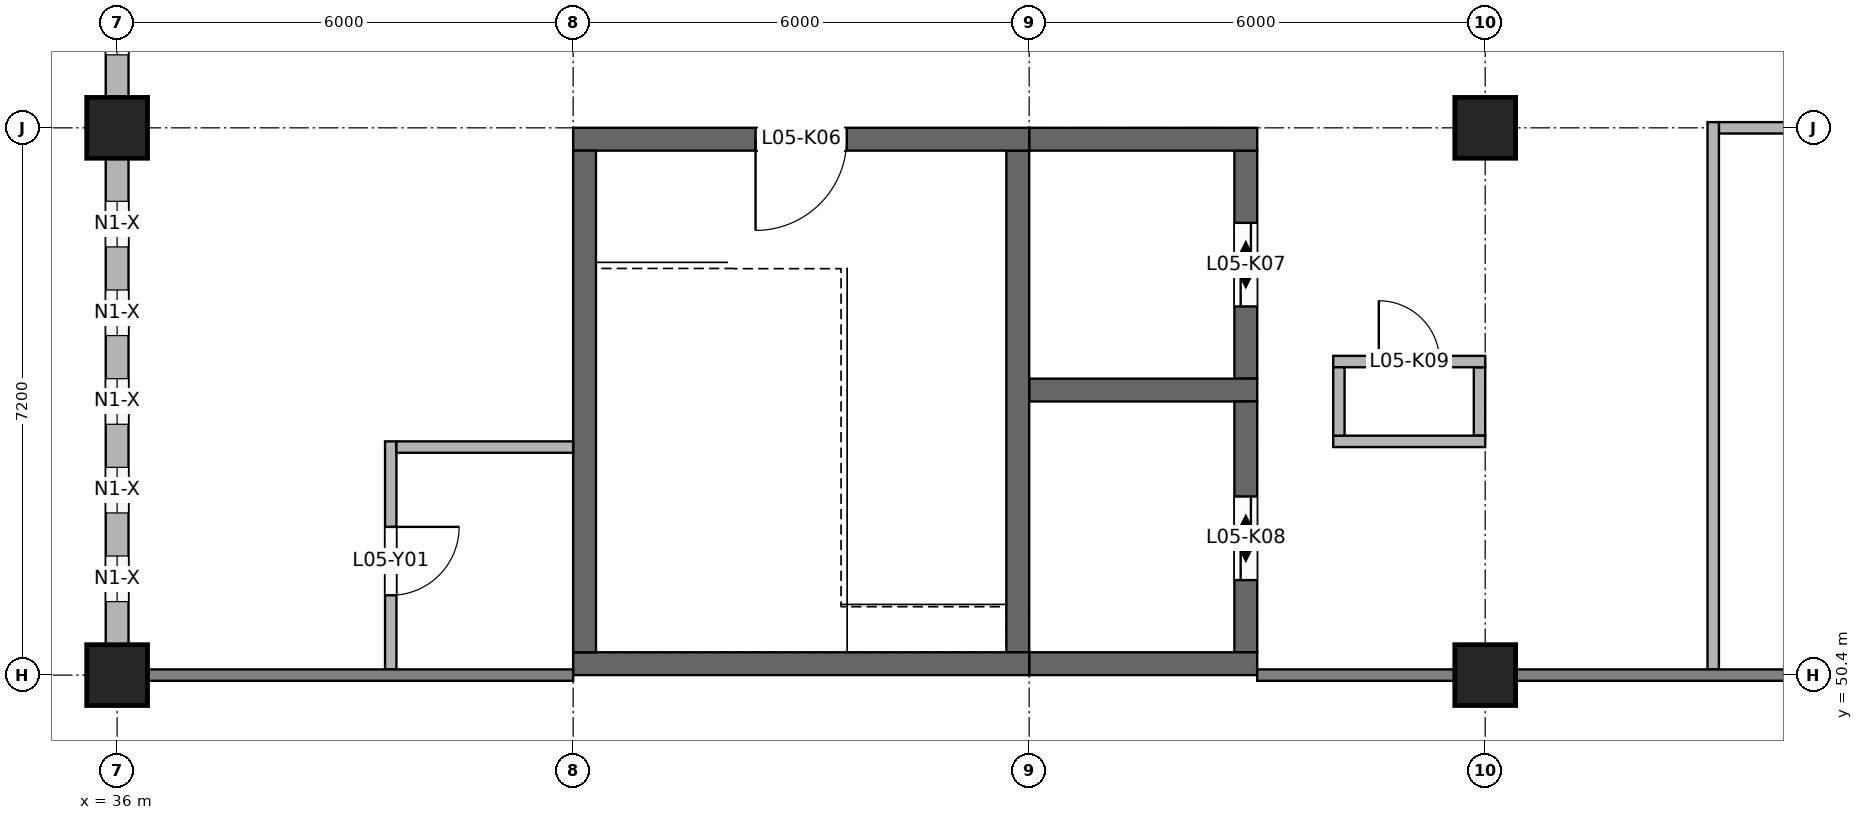
"""IFC4 building model, lengths in metres.
Left out: names, types, materials, properties, quantities, classifications, styles, units other than length and angle.
Written with IfcOpenShell. Run it as: python <this file> out.ifc"""

import sys

from ifc_helpers import new_model, si_unit, direction, frame, frame_2d, origin, origin_2d, place, context, subcontext, project, spatial, rectangle, extrude, element, fill, save


model = new_model("IFC4")
c1 = context("Model", 3, precision=1e-05, world=origin(), true_north=direction((0.0, 1.0)))
c2 = subcontext(c1, "Body", "Model", "MODEL_VIEW")
j1 = project(units=[si_unit("LENGTHUNIT", "METRE"), si_unit("PLANEANGLEUNIT", "RADIAN")], contexts=[c1])
p1 = place(None, origin())
s1 = spatial("IfcSite", under=j1, at=p1, CompositionType="ELEMENT")
p2 = place(p1, origin())
s2 = spatial("IfcBuilding", under=s1, at=p2, CompositionType="ELEMENT")
p3 = place(p2, frame((0.0, 0.0, 21.0)))
s3 = spatial("IfcBuildingStorey", under=s2, at=p3, CompositionType="ELEMENT", Elevation=21.0)
p4 = place(p3, frame((42.0, 50.55, 0.0), z_axis=(0.0, 0.0, 1.0), x_axis=(1.0, 0.0, 0.0)))
e1 = element("IfcWall", 1, at=p4, inside=s3, PredefinedType="SHEAR", context=c2, shape_type="SweptSolid", body=[
    extrude(rectangle(XDim=6.0, YDim=0.3, at=frame_2d((3.0, 0.0))), origin(), (0.0, 0.0, 1.0), 3.95),
])
p5 = place(p3, frame((42.0, 57.45, 0.0), z_axis=(0.0, 0.0, 1.0), x_axis=(1.0, 0.0, 0.0)))
e2 = element("IfcWall", 2, at=p5, inside=s3, PredefinedType="SHEAR", context=c2, shape_type="SweptSolid", body=[
    extrude(rectangle(XDim=6.0, YDim=0.3, at=frame_2d((3.0, 0.0))), origin(), (0.0, 0.0, 1.0), 3.95),
])
p6 = place(p5, frame((2.4, 0.0, 0.0)))
e3 = element("IfcOpeningElement", 3, at=p6, cuts=e2, PredefinedType="OPENING", context=c2, shape_type="SweptSolid", body=[
    extrude(rectangle(XDim=1.2, YDim=2.1, at=frame_2d((0.6, 1.05))), frame((0.0, 0.16, 0.0), z_axis=(0.0, -1.0, 0.0), x_axis=(1.0, 0.0, 0.0)), (0.0, 0.0, 1.0), 0.32),
])
for number, where, z_axis, x_axis in (
    (4, (42.15, 50.7, 0.0), (0.0, 0.0, 1.0), (0.0, 1.0, 0.0)),
    (5, (47.85, 50.7, 0.0), (0.0, 0.0, 1.0), (0.0, 1.0, 0.0)),
):
    element("IfcWall", number, at=place(p3, frame(where, z_axis=z_axis, x_axis=x_axis)), inside=s3, PredefinedType="SHEAR", context=c2, shape_type="SweptSolid", body=[
        extrude(rectangle(XDim=6.6, YDim=0.3, at=frame_2d((3.3, 0.0))), origin(), (0.0, 0.0, 1.0), 3.95),
    ])
for number, where, z_axis, x_axis in (
    (6, (48.0, 54.15, 0.0), (0.0, 0.0, 1.0), (1.0, 0.0, 0.0)),
    (7, (48.0, 57.45, 0.0), (0.0, 0.0, 1.0), (1.0, 0.0, 0.0)),
):
    element("IfcWall", number, at=place(p3, frame(where, z_axis=z_axis, x_axis=x_axis)), inside=s3, PredefinedType="SHEAR", context=c2, shape_type="SweptSolid", body=[
        extrude(rectangle(XDim=3.0, YDim=0.3, at=frame_2d((1.5, 0.0))), origin(), (0.0, 0.0, 1.0), 5.75),
    ])
p7 = place(p3, frame((50.85, 54.3, 0.0), z_axis=(0.0, 0.0, 1.0), x_axis=(0.0, 1.0, 0.0)))
e8 = element("IfcWall", 8, at=p7, inside=s3, PredefinedType="SHEAR", context=c2, shape_type="SweptSolid", body=[
    extrude(rectangle(XDim=3.0, YDim=0.3, at=frame_2d((1.5, 0.0))), origin(), (0.0, 0.0, 1.0), 5.75),
])
p8 = place(p7, frame((0.95, 0.0, 0.0)))
e9 = element("IfcOpeningElement", 9, at=p8, cuts=e8, PredefinedType="OPENING", context=c2, shape_type="SweptSolid", body=[
    extrude(rectangle(XDim=1.1, YDim=2.1, at=frame_2d((0.55, 1.05))), frame((0.0, 0.16, 0.0), z_axis=(0.0, -1.0, 0.0), x_axis=(1.0, 0.0, 0.0)), (0.0, 0.0, 1.0), 0.32),
])
p9 = place(p3, frame((48.0, 50.55, 0.0), z_axis=(0.0, 0.0, 1.0), x_axis=(1.0, 0.0, 0.0)))
e10 = element("IfcWall", 10, at=p9, inside=s3, PredefinedType="SHEAR", context=c2, shape_type="SweptSolid", body=[
    extrude(rectangle(XDim=3.0, YDim=0.3, at=frame_2d((1.5, 0.0))), origin(), (0.0, 0.0, 1.0), 5.75),
])
p10 = place(p3, frame((50.85, 50.7, 0.0), z_axis=(0.0, 0.0, 1.0), x_axis=(0.0, 1.0, 0.0)))
e11 = element("IfcWall", 11, at=p10, inside=s3, PredefinedType="SHEAR", context=c2, shape_type="SweptSolid", body=[
    extrude(rectangle(XDim=3.3, YDim=0.3, at=frame_2d((1.65, 0.0))), origin(), (0.0, 0.0, 1.0), 5.75),
])
p11 = place(p10, frame((0.95, 0.0, 0.0)))
e12 = element("IfcOpeningElement", 12, at=p11, cuts=e11, PredefinedType="OPENING", context=c2, shape_type="SweptSolid", body=[
    extrude(rectangle(XDim=1.1, YDim=2.1, at=frame_2d((0.55, 1.05))), frame((0.0, 0.16, 0.0), z_axis=(0.0, -1.0, 0.0), x_axis=(1.0, 0.0, 0.0)), (0.0, 0.0, 1.0), 0.32),
])
p12 = place(p3, frame((52.0, 53.475, 0.0), z_axis=(0.0, 0.0, 1.0), x_axis=(1.0, 0.0, 0.0)))
e13 = element("IfcWall", 13, at=p12, inside=s3, PredefinedType="SOLIDWALL", context=c2, shape_type="SweptSolid", body=[
    extrude(rectangle(XDim=2.0, YDim=0.15, at=frame_2d((1.0, 0.0))), origin(), (0.0, 0.0, 1.0), 3.95),
])
p13 = place(p3, frame((52.0, 54.525, 0.0), z_axis=(0.0, 0.0, 1.0), x_axis=(1.0, 0.0, 0.0)))
e14 = element("IfcWall", 14, at=p13, inside=s3, PredefinedType="SOLIDWALL", context=c2, shape_type="SweptSolid", body=[
    extrude(rectangle(XDim=2.0, YDim=0.15, at=frame_2d((1.0, 0.0))), origin(), (0.0, 0.0, 1.0), 3.95),
])
p14 = place(p13, frame((0.6, 0.0, 0.0)))
e15 = element("IfcOpeningElement", 15, at=p14, cuts=e14, PredefinedType="OPENING", context=c2, shape_type="SweptSolid", body=[
    extrude(rectangle(XDim=0.8, YDim=2.1, at=frame_2d((0.4, 1.05))), frame((0.0, 0.085, 0.0), z_axis=(0.0, -1.0, 0.0), x_axis=(1.0, 0.0, 0.0)), (0.0, 0.0, 1.0), 0.17),
])
p15 = place(p3, frame((52.075, 53.55, 0.0), z_axis=(0.0, 0.0, 1.0), x_axis=(0.0, 1.0, 0.0)))
e16 = element("IfcWall", 16, at=p15, inside=s3, PredefinedType="SOLIDWALL", context=c2, shape_type="SweptSolid", body=[
    extrude(rectangle(XDim=0.9, YDim=0.15, at=frame_2d((0.45, 0.0))), origin(), (0.0, 0.0, 1.0), 3.95),
])
p16 = place(p3, frame((53.925, 53.55, 0.0), z_axis=(0.0, 0.0, 1.0), x_axis=(0.0, 1.0, 0.0)))
e17 = element("IfcWall", 17, at=p16, inside=s3, PredefinedType="SOLIDWALL", context=c2, shape_type="SweptSolid", body=[
    extrude(rectangle(XDim=0.9, YDim=0.15, at=frame_2d((0.45, 0.0))), origin(), (0.0, 0.0, 1.0), 3.15),
])
for number, where, z_axis, x_axis in (
    (18, (36.0, 50.4, 0.0), (0.0, 0.0, 1.0), (1.0, 0.0, 0.0)),
    (19, (54.0, 50.4, 0.0), (0.0, 0.0, 1.0), (1.0, 0.0, 0.0)),
    (20, (36.0, 57.6, 0.0), (0.0, 0.0, 1.0), (1.0, 0.0, 0.0)),
    (21, (54.0, 57.6, 0.0), (0.0, 0.0, 1.0), (1.0, 0.0, 0.0)),
):
    element("IfcColumn", number, at=place(p3, frame(where, z_axis=z_axis, x_axis=x_axis)), inside=s3, PredefinedType="COLUMN", context=c2, shape_type="SweptSolid", body=[
        extrude(rectangle(XDim=0.8, YDim=0.8, at=origin_2d()), origin(), (0.0, 0.0, 1.0), 3.95),
    ])
p17 = place(p3, frame((36.0, 50.8, 0.0), z_axis=(0.0, 0.0, 1.0), x_axis=(0.0, 1.0, 0.0)))
e22 = element("IfcWall", 22, at=p17, inside=s3, PredefinedType="SOLIDWALL", context=c2, shape_type="SweptSolid", body=[
    extrude(rectangle(XDim=6.4, YDim=0.3, at=frame_2d((3.2, 0.0))), origin(), (0.0, 0.0, 1.0), 3.15),
])
p18 = place(p17, frame((0.567, 0.0, 0.9)))
e23 = element("IfcOpeningElement", 23, at=p18, cuts=e22, PredefinedType="OPENING", context=c2, shape_type="SweptSolid", body=[
    extrude(rectangle(XDim=0.6, YDim=1.9, at=frame_2d((0.3, 0.95))), frame((0.0, 0.16, 0.0), z_axis=(0.0, -1.0, 0.0), x_axis=(1.0, 0.0, 0.0)), (0.0, 0.0, 1.0), 0.32),
])
p19 = place(p17, frame((1.733, 0.0, 0.9)))
e24 = element("IfcOpeningElement", 24, at=p19, cuts=e22, PredefinedType="OPENING", context=c2, shape_type="SweptSolid", body=[
    extrude(rectangle(XDim=0.6, YDim=1.9, at=frame_2d((0.3, 0.95))), frame((0.0, 0.16, 0.0), z_axis=(0.0, -1.0, 0.0), x_axis=(1.0, 0.0, 0.0)), (0.0, 0.0, 1.0), 0.32),
])
p20 = place(p17, frame((2.9, 0.0, 0.9)))
e25 = element("IfcOpeningElement", 25, at=p20, cuts=e22, PredefinedType="OPENING", context=c2, shape_type="SweptSolid", body=[
    extrude(rectangle(XDim=0.6, YDim=1.9, at=frame_2d((0.3, 0.95))), frame((0.0, 0.16, 0.0), z_axis=(0.0, -1.0, 0.0), x_axis=(1.0, 0.0, 0.0)), (0.0, 0.0, 1.0), 0.32),
])
p21 = place(p17, frame((4.067, 0.0, 0.9)))
e26 = element("IfcOpeningElement", 26, at=p21, cuts=e22, PredefinedType="OPENING", context=c2, shape_type="SweptSolid", body=[
    extrude(rectangle(XDim=0.6, YDim=1.9, at=frame_2d((0.3, 0.95))), frame((0.0, 0.16, 0.0), z_axis=(0.0, -1.0, 0.0), x_axis=(1.0, 0.0, 0.0)), (0.0, 0.0, 1.0), 0.32),
])
p22 = place(p17, frame((5.233, 0.0, 0.9)))
e27 = element("IfcOpeningElement", 27, at=p22, cuts=e22, PredefinedType="OPENING", context=c2, shape_type="SweptSolid", body=[
    extrude(rectangle(XDim=0.6, YDim=1.9, at=frame_2d((0.3, 0.95))), frame((0.0, 0.16, 0.0), z_axis=(0.0, -1.0, 0.0), x_axis=(1.0, 0.0, 0.0)), (0.0, 0.0, 1.0), 0.32),
])
p23 = place(p3, frame((36.0, 58.0, 0.0), z_axis=(0.0, 0.0, 1.0), x_axis=(0.0, 1.0, 0.0)))
e28 = element("IfcWall", 28, at=p23, inside=s3, PredefinedType="SOLIDWALL", context=c2, shape_type="SweptSolid", body=[
    extrude(rectangle(XDim=6.4, YDim=0.3, at=frame_2d((3.2, 0.0))), origin(), (0.0, 0.0, 1.0), 3.15),
])
p24 = place(p23, frame((0.56, 0.0, 0.9)))
e29 = element("IfcOpeningElement", 29, at=p24, cuts=e28, PredefinedType="OPENING", context=c2, shape_type="SweptSolid", body=[
    extrude(rectangle(XDim=0.6, YDim=1.9, at=frame_2d((0.3, 0.95))), frame((0.0, 0.16, 0.0), z_axis=(0.0, -1.0, 0.0), x_axis=(1.0, 0.0, 0.0)), (0.0, 0.0, 1.0), 0.32),
])
p25 = place(p23, frame((2.86, 0.0, 0.9)))
e30 = element("IfcOpeningElement", 30, at=p25, cuts=e28, PredefinedType="OPENING", context=c2, shape_type="SweptSolid", body=[
    extrude(rectangle(XDim=0.6, YDim=1.9, at=frame_2d((0.3, 0.95))), frame((0.0, 0.16, 0.0), z_axis=(0.0, -1.0, 0.0), x_axis=(1.0, 0.0, 0.0)), (0.0, 0.0, 1.0), 0.32),
])
p26 = place(p23, frame((4.04, 0.0, 0.9)))
e31 = element("IfcOpeningElement", 31, at=p26, cuts=e28, PredefinedType="OPENING", context=c2, shape_type="SweptSolid", body=[
    extrude(rectangle(XDim=0.6, YDim=1.9, at=frame_2d((0.3, 0.95))), frame((0.0, 0.16, 0.0), z_axis=(0.0, -1.0, 0.0), x_axis=(1.0, 0.0, 0.0)), (0.0, 0.0, 1.0), 0.32),
])
p27 = place(p23, frame((5.22, 0.0, 0.9)))
e32 = element("IfcOpeningElement", 32, at=p27, cuts=e28, PredefinedType="OPENING", context=c2, shape_type="SweptSolid", body=[
    extrude(rectangle(XDim=0.6, YDim=1.9, at=frame_2d((0.3, 0.95))), frame((0.0, 0.16, 0.0), z_axis=(0.0, -1.0, 0.0), x_axis=(1.0, 0.0, 0.0)), (0.0, 0.0, 1.0), 0.32),
])
p28 = place(p3, frame((39.6, 50.475, 0.0), z_axis=(0.0, 0.0, 1.0), x_axis=(0.0, 1.0, 0.0)))
e33 = element("IfcWall", 33, at=p28, inside=s3, PredefinedType="PARTITIONING", context=c2, shape_type="SweptSolid", body=[
    extrude(rectangle(XDim=3.0, YDim=0.15, at=frame_2d((1.5, 0.0))), origin(), (0.0, 0.0, 1.0), 3.95),
])
p29 = place(p28, frame((0.975, 0.0, 0.0)))
e34 = element("IfcOpeningElement", 34, at=p29, cuts=e33, PredefinedType="OPENING", context=c2, shape_type="SweptSolid", body=[
    extrude(rectangle(XDim=0.9, YDim=2.1, at=frame_2d((0.45, 1.05))), frame((0.0, 0.085, 0.0), z_axis=(0.0, -1.0, 0.0), x_axis=(1.0, 0.0, 0.0)), (0.0, 0.0, 1.0), 0.17),
])
p30 = place(p3, frame((57.0, 50.475, 0.0), z_axis=(0.0, 0.0, 1.0), x_axis=(0.0, 1.0, 0.0)))
e35 = element("IfcWall", 35, at=p30, inside=s3, PredefinedType="PARTITIONING", context=c2, shape_type="SweptSolid", body=[
    extrude(rectangle(XDim=7.2, YDim=0.15, at=frame_2d((3.6, 0.0))), origin(), (0.0, 0.0, 1.0), 3.25),
])
p31 = place(p3, frame((39.675, 53.4, 0.0), z_axis=(0.0, 0.0, 1.0), x_axis=(1.0, 0.0, 0.0)))
e36 = element("IfcWall", 36, at=p31, inside=s3, PredefinedType="PARTITIONING", context=c2, shape_type="SweptSolid", body=[
    extrude(rectangle(XDim=2.325, YDim=0.15, at=frame_2d((1.163, 0.0))), origin(), (0.0, 0.0, 1.0), 3.95),
])
p32 = place(p3, frame((57.075, 57.6, 0.0), z_axis=(0.0, 0.0, 1.0), x_axis=(1.0, 0.0, 0.0)))
e37 = element("IfcWall", 37, at=p32, inside=s3, PredefinedType="PARTITIONING", context=c2, shape_type="SweptSolid", body=[
    extrude(rectangle(XDim=26.525, YDim=0.15, at=frame_2d((13.263, 0.0))), origin(), (0.0, 0.0, 1.0), 3.25),
])
p33 = place(p32, frame((3.825, 0.0, 0.0)))
e38 = element("IfcOpeningElement", 38, at=p33, cuts=e37, PredefinedType="OPENING", context=c2, shape_type="SweptSolid", body=[
    extrude(rectangle(XDim=1.2, YDim=2.1, at=frame_2d((0.6, 1.05))), frame((0.0, 0.085, 0.0), z_axis=(0.0, -1.0, 0.0), x_axis=(1.0, 0.0, 0.0)), (0.0, 0.0, 1.0), 0.17),
])
p34 = place(p32, frame((11.175, 0.0, 0.0)))
e39 = element("IfcOpeningElement", 39, at=p34, cuts=e37, PredefinedType="OPENING", context=c2, shape_type="SweptSolid", body=[
    extrude(rectangle(XDim=0.9, YDim=2.1, at=frame_2d((0.45, 1.05))), frame((0.0, 0.085, 0.0), z_axis=(0.0, -1.0, 0.0), x_axis=(1.0, 0.0, 0.0)), (0.0, 0.0, 1.0), 0.17),
])
p35 = place(p32, frame((15.975, 0.0, 0.0)))
e40 = element("IfcOpeningElement", 40, at=p35, cuts=e37, PredefinedType="OPENING", context=c2, shape_type="SweptSolid", body=[
    extrude(rectangle(XDim=0.9, YDim=2.1, at=frame_2d((0.45, 1.05))), frame((0.0, 0.085, 0.0), z_axis=(0.0, -1.0, 0.0), x_axis=(1.0, 0.0, 0.0)), (0.0, 0.0, 1.0), 0.17),
])
p36 = place(p32, frame((21.975, 0.0, 0.0)))
e41 = element("IfcOpeningElement", 41, at=p36, cuts=e37, PredefinedType="OPENING", context=c2, shape_type="SweptSolid", body=[
    extrude(rectangle(XDim=0.9, YDim=2.1, at=frame_2d((0.45, 1.05))), frame((0.0, 0.085, 0.0), z_axis=(0.0, -1.0, 0.0), x_axis=(1.0, 0.0, 0.0)), (0.0, 0.0, 1.0), 0.17),
])
p37 = place(p18, origin())
e42 = element("IfcWindow", 42, at=p37, inside=s3, PartitioningType="SINGLE_PANEL", PredefinedType="WINDOW", context=c2, shape_type="SweptSolid", body=[
    extrude(rectangle(XDim=0.6, YDim=1.9, at=frame_2d((0.3, 0.95))), frame((0.0, 0.03, 0.0), z_axis=(0.0, -1.0, 0.0), x_axis=(1.0, 0.0, 0.0)), (0.0, 0.0, 1.0), 0.06),
])
fill(e23, e42)
p38 = place(p19, origin())
e43 = element("IfcWindow", 43, at=p38, inside=s3, PartitioningType="SINGLE_PANEL", PredefinedType="WINDOW", context=c2, shape_type="SweptSolid", body=[
    extrude(rectangle(XDim=0.6, YDim=1.9, at=frame_2d((0.3, 0.95))), frame((0.0, 0.03, 0.0), z_axis=(0.0, -1.0, 0.0), x_axis=(1.0, 0.0, 0.0)), (0.0, 0.0, 1.0), 0.06),
])
fill(e24, e43)
p39 = place(p20, origin())
e44 = element("IfcWindow", 44, at=p39, inside=s3, PartitioningType="SINGLE_PANEL", PredefinedType="WINDOW", context=c2, shape_type="SweptSolid", body=[
    extrude(rectangle(XDim=0.6, YDim=1.9, at=frame_2d((0.3, 0.95))), frame((0.0, 0.03, 0.0), z_axis=(0.0, -1.0, 0.0), x_axis=(1.0, 0.0, 0.0)), (0.0, 0.0, 1.0), 0.06),
])
fill(e25, e44)
p40 = place(p21, origin())
e45 = element("IfcWindow", 45, at=p40, inside=s3, PartitioningType="SINGLE_PANEL", PredefinedType="WINDOW", context=c2, shape_type="SweptSolid", body=[
    extrude(rectangle(XDim=0.6, YDim=1.9, at=frame_2d((0.3, 0.95))), frame((0.0, 0.03, 0.0), z_axis=(0.0, -1.0, 0.0), x_axis=(1.0, 0.0, 0.0)), (0.0, 0.0, 1.0), 0.06),
])
fill(e26, e45)
p41 = place(p22, origin())
e46 = element("IfcWindow", 46, at=p41, inside=s3, PartitioningType="SINGLE_PANEL", PredefinedType="WINDOW", context=c2, shape_type="SweptSolid", body=[
    extrude(rectangle(XDim=0.6, YDim=1.9, at=frame_2d((0.3, 0.95))), frame((0.0, 0.03, 0.0), z_axis=(0.0, -1.0, 0.0), x_axis=(1.0, 0.0, 0.0)), (0.0, 0.0, 1.0), 0.06),
])
fill(e27, e46)
p42 = place(p24, origin())
e47 = element("IfcWindow", 47, at=p42, inside=s3, PartitioningType="SINGLE_PANEL", PredefinedType="WINDOW", context=c2, shape_type="SweptSolid", body=[
    extrude(rectangle(XDim=0.6, YDim=1.9, at=frame_2d((0.3, 0.95))), frame((0.0, 0.03, 0.0), z_axis=(0.0, -1.0, 0.0), x_axis=(1.0, 0.0, 0.0)), (0.0, 0.0, 1.0), 0.06),
])
fill(e29, e47)
p43 = place(p6, frame((1.2, 0.0, 0.0), z_axis=(0.0, 0.0, 1.0), x_axis=(-1.0, 0.0, 0.0)))
e48 = element("IfcDoor", 48, at=p43, inside=s3, OperationType="SINGLE_SWING_RIGHT", PredefinedType="DOOR", context=c2, shape_type="SweptSolid", body=[
    extrude(rectangle(XDim=1.2, YDim=2.1, at=frame_2d((0.6, 1.05))), frame((0.0, 0.025, 0.0), z_axis=(0.0, -1.0, 0.0), x_axis=(1.0, 0.0, 0.0)), (0.0, 0.0, 1.0), 0.05),
])
fill(e3, e48)
p44 = place(p8, origin())
e49 = element("IfcDoor", 49, at=p44, inside=s3, OperationType="DOUBLE_DOOR_SLIDING", PredefinedType="DOOR", context=c2, shape_type="SweptSolid", body=[
    extrude(rectangle(XDim=1.1, YDim=2.1, at=frame_2d((0.55, 1.05))), frame((0.0, 0.025, 0.0), z_axis=(0.0, -1.0, 0.0), x_axis=(1.0, 0.0, 0.0)), (0.0, 0.0, 1.0), 0.05),
])
fill(e9, e49)
p45 = place(p11, origin())
e50 = element("IfcDoor", 50, at=p45, inside=s3, OperationType="DOUBLE_DOOR_SLIDING", PredefinedType="DOOR", context=c2, shape_type="SweptSolid", body=[
    extrude(rectangle(XDim=1.1, YDim=2.1, at=frame_2d((0.55, 1.05))), frame((0.0, 0.025, 0.0), z_axis=(0.0, -1.0, 0.0), x_axis=(1.0, 0.0, 0.0)), (0.0, 0.0, 1.0), 0.05),
])
fill(e12, e50)
p46 = place(p14, origin())
e51 = element("IfcDoor", 51, at=p46, inside=s3, OperationType="SINGLE_SWING_LEFT", PredefinedType="DOOR", context=c2, shape_type="SweptSolid", body=[
    extrude(rectangle(XDim=0.8, YDim=2.1, at=frame_2d((0.4, 1.05))), frame((0.0, 0.025, 0.0), z_axis=(0.0, -1.0, 0.0), x_axis=(1.0, 0.0, 0.0)), (0.0, 0.0, 1.0), 0.05),
])
fill(e15, e51)
p47 = place(p29, frame((0.9, 0.0, 0.0), z_axis=(0.0, 0.0, 1.0), x_axis=(-1.0, 0.0, 0.0)))
e52 = element("IfcDoor", 52, at=p47, inside=s3, OperationType="SINGLE_SWING_LEFT", PredefinedType="DOOR", context=c2, shape_type="SweptSolid", body=[
    extrude(rectangle(XDim=0.9, YDim=2.1, at=frame_2d((0.45, 1.05))), frame((0.0, 0.025, 0.0), z_axis=(0.0, -1.0, 0.0), x_axis=(1.0, 0.0, 0.0)), (0.0, 0.0, 1.0), 0.05),
])
fill(e34, e52)
save(model, sys.argv[1])
